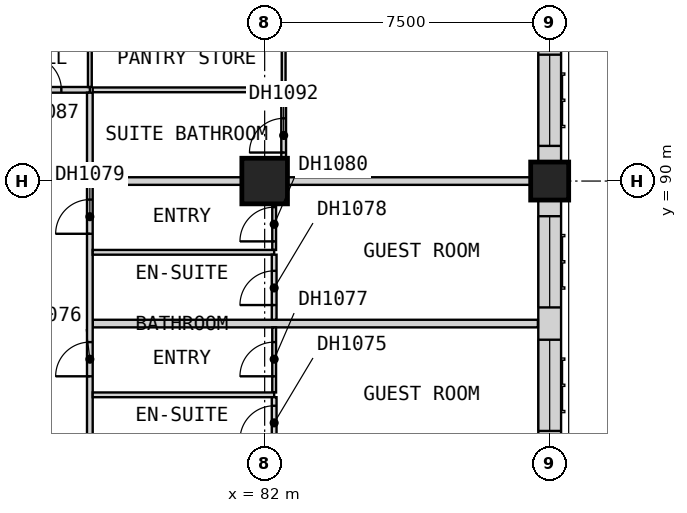
"""IFC4 building model, lengths in metres.
Left out: names, types, materials, properties, quantities, classifications, styles, units other than length and angle.
Written with IfcOpenShell. Run it as: python <this file> out.ifc"""

import sys

from ifc_helpers import new_model, si_unit, direction, frame, frame_2d, origin, origin_2d, place, context, subcontext, project, spatial, rectangle, extrude, element, fill, save


model = new_model("IFC4")
c1 = context("Model", 3, precision=1e-05, world=origin(), true_north=direction((0.0, 1.0)))
c2 = subcontext(c1, "Body", "Model", "MODEL_VIEW")
j1 = project(units=[si_unit("LENGTHUNIT", "METRE"), si_unit("PLANEANGLEUNIT", "RADIAN")], contexts=[c1])
p1 = place(None, origin())
s1 = spatial("IfcSite", under=j1, at=p1, CompositionType="ELEMENT")
p2 = place(p1, origin())
s2 = spatial("IfcBuilding", under=s1, at=p2, CompositionType="ELEMENT")
p3 = place(p2, frame((0.0, 0.0, 34.0)))
s3 = spatial("IfcBuildingStorey", under=s2, at=p3, CompositionType="ELEMENT", Elevation=34.0)
p4 = place(p3, frame((82.0, 90.0, 0.0), z_axis=(0.0, 0.0, 1.0), x_axis=(1.0, 0.0, 0.0)))
e1 = element("IfcColumn", 1, at=p4, inside=s3, PredefinedType="COLUMN", context=c2, shape_type="SweptSolid", body=[
    extrude(rectangle(XDim=1.2, YDim=1.2, at=origin_2d()), origin(), (0.0, 0.0, 1.0), 3.6),
])
p5 = place(p3, frame((89.5, 90.0, 0.0), z_axis=(0.0, 0.0, 1.0), x_axis=(1.0, 0.0, 0.0)))
e2 = element("IfcColumn", 2, at=p5, inside=s3, PredefinedType="COLUMN", context=c2, shape_type="SweptSolid", body=[
    extrude(rectangle(XDim=1.0, YDim=1.0, at=origin_2d()), origin(), (0.0, 0.0, 1.0), 3.6),
])
p6 = place(p3, frame((89.5, 83.0, 0.0), z_axis=(0.0, 0.0, 1.0), x_axis=(0.0, 1.0, 0.0)))
e3 = element("IfcWall", 3, at=p6, inside=s3, PredefinedType="SOLIDWALL", context=c2, shape_type="SweptSolid", body=[
    extrude(rectangle(XDim=6.5, YDim=0.6, at=frame_2d((3.25, 0.0))), origin(), (0.0, 0.0, 1.0), 2.85),
])
p7 = place(p6, frame((0.425, 0.0, 0.8)))
e4 = element("IfcOpeningElement", 4, at=p7, cuts=e3, PredefinedType="OPENING", context=c2, shape_type="SweptSolid", body=[
    extrude(rectangle(XDim=2.4, YDim=1.8, at=frame_2d((1.2, 0.9))), frame((0.0, 0.31, 0.0), z_axis=(0.0, -1.0, 0.0), x_axis=(1.0, 0.0, 0.0)), (0.0, 0.0, 1.0), 0.62),
])
p8 = place(p6, frame((3.675, 0.0, 0.8)))
e5 = element("IfcOpeningElement", 5, at=p8, cuts=e3, PredefinedType="OPENING", context=c2, shape_type="SweptSolid", body=[
    extrude(rectangle(XDim=2.4, YDim=1.8, at=frame_2d((1.2, 0.9))), frame((0.0, 0.31, 0.0), z_axis=(0.0, -1.0, 0.0), x_axis=(1.0, 0.0, 0.0)), (0.0, 0.0, 1.0), 0.62),
])
p9 = place(p3, frame((89.5, 90.5, 0.0), z_axis=(0.0, 0.0, 1.0), x_axis=(0.0, 1.0, 0.0)))
e6 = element("IfcWall", 6, at=p9, inside=s3, PredefinedType="SOLIDWALL", context=c2, shape_type="SweptSolid", body=[
    extrude(rectangle(XDim=6.0, YDim=0.6, at=frame_2d((3.0, 0.0))), origin(), (0.0, 0.0, 1.0), 2.85),
])
p10 = place(p9, frame((0.425, 0.0, 0.8)))
e7 = element("IfcOpeningElement", 7, at=p10, cuts=e6, PredefinedType="OPENING", context=c2, shape_type="SweptSolid", body=[
    extrude(rectangle(XDim=2.4, YDim=1.8, at=frame_2d((1.2, 0.9))), frame((0.0, 0.31, 0.0), z_axis=(0.0, -1.0, 0.0), x_axis=(1.0, 0.0, 0.0)), (0.0, 0.0, 1.0), 0.62),
])
p11 = place(p9, frame((3.425, 0.0, 0.8)))
e8 = element("IfcOpeningElement", 8, at=p11, cuts=e6, PredefinedType="OPENING", context=c2, shape_type="SweptSolid", body=[
    extrude(rectangle(XDim=2.4, YDim=1.8, at=frame_2d((1.2, 0.9))), frame((0.0, 0.31, 0.0), z_axis=(0.0, -1.0, 0.0), x_axis=(1.0, 0.0, 0.0)), (0.0, 0.0, 1.0), 0.62),
])
p12 = place(p3, frame((77.475, 86.25, 0.0), z_axis=(0.0, 0.0, 1.0), x_axis=(1.0, 0.0, 0.0)))
e9 = element("IfcWall", 9, at=p12, inside=s3, PredefinedType="PARTITIONING", context=c2, shape_type="SweptSolid", body=[
    extrude(rectangle(XDim=11.715, YDim=0.2, at=frame_2d((5.857, 0.0))), origin(), (0.0, 0.0, 1.0), 3.35),
])
p13 = place(p3, frame((77.475, 90.0, 0.0), z_axis=(0.0, 0.0, 1.0), x_axis=(1.0, 0.0, 0.0)))
e10 = element("IfcWall", 10, at=p13, inside=s3, PredefinedType="PARTITIONING", context=c2, shape_type="SweptSolid", body=[
    extrude(rectangle(XDim=12.525, YDim=0.2, at=frame_2d((6.262, 0.0))), origin(), (0.0, 0.0, 1.0), 3.35),
])
p14 = place(p3, frame((33.75, 92.4, 0.0), z_axis=(0.0, 0.0, 1.0), x_axis=(1.0, 0.0, 0.0)))
e11 = element("IfcWall", 11, at=p14, inside=s3, PredefinedType="PARTITIONING", context=c2, shape_type="SweptSolid", body=[
    extrude(rectangle(XDim=43.65, YDim=0.15, at=frame_2d((21.825, 0.0))), origin(), (0.0, 0.0, 1.0), 3.35),
])
p15 = place(p14, frame((5.175, 0.0, 0.0)))
e12 = element("IfcOpeningElement", 12, at=p15, cuts=e11, PredefinedType="OPENING", context=c2, shape_type="SweptSolid", body=[
    extrude(rectangle(XDim=0.9, YDim=2.1, at=frame_2d((0.45, 1.05))), frame((0.0, 0.085, 0.0), z_axis=(0.0, -1.0, 0.0), x_axis=(1.0, 0.0, 0.0)), (0.0, 0.0, 1.0), 0.17),
])
p16 = place(p14, frame((9.863, 0.0, 0.0)))
e13 = element("IfcOpeningElement", 13, at=p16, cuts=e11, PredefinedType="OPENING", context=c2, shape_type="SweptSolid", body=[
    extrude(rectangle(XDim=0.9, YDim=2.1, at=frame_2d((0.45, 1.05))), frame((0.0, 0.085, 0.0), z_axis=(0.0, -1.0, 0.0), x_axis=(1.0, 0.0, 0.0)), (0.0, 0.0, 1.0), 0.17),
])
p17 = place(p14, frame((13.613, 0.0, 0.0)))
e14 = element("IfcOpeningElement", 14, at=p17, cuts=e11, PredefinedType="OPENING", context=c2, shape_type="SweptSolid", body=[
    extrude(rectangle(XDim=0.9, YDim=2.1, at=frame_2d((0.45, 1.05))), frame((0.0, 0.085, 0.0), z_axis=(0.0, -1.0, 0.0), x_axis=(1.0, 0.0, 0.0)), (0.0, 0.0, 1.0), 0.17),
])
p18 = place(p14, frame((17.363, 0.0, 0.0)))
e15 = element("IfcOpeningElement", 15, at=p18, cuts=e11, PredefinedType="OPENING", context=c2, shape_type="SweptSolid", body=[
    extrude(rectangle(XDim=0.9, YDim=2.1, at=frame_2d((0.45, 1.05))), frame((0.0, 0.085, 0.0), z_axis=(0.0, -1.0, 0.0), x_axis=(1.0, 0.0, 0.0)), (0.0, 0.0, 1.0), 0.17),
])
p19 = place(p14, frame((21.113, 0.0, 0.0)))
e16 = element("IfcOpeningElement", 16, at=p19, cuts=e11, PredefinedType="OPENING", context=c2, shape_type="SweptSolid", body=[
    extrude(rectangle(XDim=0.9, YDim=2.1, at=frame_2d((0.45, 1.05))), frame((0.0, 0.085, 0.0), z_axis=(0.0, -1.0, 0.0), x_axis=(1.0, 0.0, 0.0)), (0.0, 0.0, 1.0), 0.17),
])
p20 = place(p14, frame((28.05, 0.0, 0.0)))
e17 = element("IfcOpeningElement", 17, at=p20, cuts=e11, PredefinedType="OPENING", context=c2, shape_type="SweptSolid", body=[
    extrude(rectangle(XDim=0.9, YDim=2.1, at=frame_2d((0.45, 1.05))), frame((0.0, 0.085, 0.0), z_axis=(0.0, -1.0, 0.0), x_axis=(1.0, 0.0, 0.0)), (0.0, 0.0, 1.0), 0.17),
])
p21 = place(p14, frame((32.363, 0.0, 0.0)))
e18 = element("IfcOpeningElement", 18, at=p21, cuts=e11, PredefinedType="OPENING", context=c2, shape_type="SweptSolid", body=[
    extrude(rectangle(XDim=0.9, YDim=2.1, at=frame_2d((0.45, 1.05))), frame((0.0, 0.085, 0.0), z_axis=(0.0, -1.0, 0.0), x_axis=(1.0, 0.0, 0.0)), (0.0, 0.0, 1.0), 0.17),
])
p22 = place(p14, frame((39.3, 0.0, 0.0)))
e19 = element("IfcOpeningElement", 19, at=p22, cuts=e11, PredefinedType="OPENING", context=c2, shape_type="SweptSolid", body=[
    extrude(rectangle(XDim=0.9, YDim=2.1, at=frame_2d((0.45, 1.05))), frame((0.0, 0.085, 0.0), z_axis=(0.0, -1.0, 0.0), x_axis=(1.0, 0.0, 0.0)), (0.0, 0.0, 1.0), 0.17),
])
p23 = place(p14, frame((42.0, 0.0, 0.0)))
e20 = element("IfcOpeningElement", 20, at=p23, cuts=e11, PredefinedType="OPENING", context=c2, shape_type="SweptSolid", body=[
    extrude(rectangle(XDim=0.9, YDim=2.1, at=frame_2d((0.45, 1.05))), frame((0.0, 0.085, 0.0), z_axis=(0.0, -1.0, 0.0), x_axis=(1.0, 0.0, 0.0)), (0.0, 0.0, 1.0), 0.17),
])
p24 = place(p3, frame((77.4, 50.175, 0.0), z_axis=(0.0, 0.0, 1.0), x_axis=(0.0, 1.0, 0.0)))
e21 = element("IfcWall", 21, at=p24, inside=s3, PredefinedType="PARTITIONING", context=c2, shape_type="SweptSolid", body=[
    extrude(rectangle(XDim=42.15, YDim=0.15, at=frame_2d((21.075, 0.0))), origin(), (0.0, 0.0, 1.0), 3.35),
])
p25 = place(p24, frame((4.688, 0.0, 0.0)))
e22 = element("IfcOpeningElement", 22, at=p25, cuts=e21, PredefinedType="OPENING", context=c2, shape_type="SweptSolid", body=[
    extrude(rectangle(XDim=0.9, YDim=2.1, at=frame_2d((0.45, 1.05))), frame((0.0, 0.085, 0.0), z_axis=(0.0, -1.0, 0.0), x_axis=(1.0, 0.0, 0.0)), (0.0, 0.0, 1.0), 0.17),
])
p26 = place(p24, frame((8.438, 0.0, 0.0)))
e23 = element("IfcOpeningElement", 23, at=p26, cuts=e21, PredefinedType="OPENING", context=c2, shape_type="SweptSolid", body=[
    extrude(rectangle(XDim=0.9, YDim=2.1, at=frame_2d((0.45, 1.05))), frame((0.0, 0.085, 0.0), z_axis=(0.0, -1.0, 0.0), x_axis=(1.0, 0.0, 0.0)), (0.0, 0.0, 1.0), 0.17),
])
p27 = place(p24, frame((12.188, 0.0, 0.0)))
e24 = element("IfcOpeningElement", 24, at=p27, cuts=e21, PredefinedType="OPENING", context=c2, shape_type="SweptSolid", body=[
    extrude(rectangle(XDim=0.9, YDim=2.1, at=frame_2d((0.45, 1.05))), frame((0.0, 0.085, 0.0), z_axis=(0.0, -1.0, 0.0), x_axis=(1.0, 0.0, 0.0)), (0.0, 0.0, 1.0), 0.17),
])
p28 = place(p24, frame((15.938, 0.0, 0.0)))
e25 = element("IfcOpeningElement", 25, at=p28, cuts=e21, PredefinedType="OPENING", context=c2, shape_type="SweptSolid", body=[
    extrude(rectangle(XDim=0.9, YDim=2.1, at=frame_2d((0.45, 1.05))), frame((0.0, 0.085, 0.0), z_axis=(0.0, -1.0, 0.0), x_axis=(1.0, 0.0, 0.0)), (0.0, 0.0, 1.0), 0.17),
])
p29 = place(p24, frame((19.688, 0.0, 0.0)))
e26 = element("IfcOpeningElement", 26, at=p29, cuts=e21, PredefinedType="OPENING", context=c2, shape_type="SweptSolid", body=[
    extrude(rectangle(XDim=0.9, YDim=2.1, at=frame_2d((0.45, 1.05))), frame((0.0, 0.085, 0.0), z_axis=(0.0, -1.0, 0.0), x_axis=(1.0, 0.0, 0.0)), (0.0, 0.0, 1.0), 0.17),
])
p30 = place(p24, frame((23.438, 0.0, 0.0)))
e27 = element("IfcOpeningElement", 27, at=p30, cuts=e21, PredefinedType="OPENING", context=c2, shape_type="SweptSolid", body=[
    extrude(rectangle(XDim=0.9, YDim=2.1, at=frame_2d((0.45, 1.05))), frame((0.0, 0.085, 0.0), z_axis=(0.0, -1.0, 0.0), x_axis=(1.0, 0.0, 0.0)), (0.0, 0.0, 1.0), 0.17),
])
p31 = place(p24, frame((27.188, 0.0, 0.0)))
e28 = element("IfcOpeningElement", 28, at=p31, cuts=e21, PredefinedType="OPENING", context=c2, shape_type="SweptSolid", body=[
    extrude(rectangle(XDim=0.9, YDim=2.1, at=frame_2d((0.45, 1.05))), frame((0.0, 0.085, 0.0), z_axis=(0.0, -1.0, 0.0), x_axis=(1.0, 0.0, 0.0)), (0.0, 0.0, 1.0), 0.17),
])
p32 = place(p24, frame((30.938, 0.0, 0.0)))
e29 = element("IfcOpeningElement", 29, at=p32, cuts=e21, PredefinedType="OPENING", context=c2, shape_type="SweptSolid", body=[
    extrude(rectangle(XDim=0.9, YDim=2.1, at=frame_2d((0.45, 1.05))), frame((0.0, 0.085, 0.0), z_axis=(0.0, -1.0, 0.0), x_axis=(1.0, 0.0, 0.0)), (0.0, 0.0, 1.0), 0.17),
])
p33 = place(p24, frame((34.688, 0.0, 0.0)))
e30 = element("IfcOpeningElement", 30, at=p33, cuts=e21, PredefinedType="OPENING", context=c2, shape_type="SweptSolid", body=[
    extrude(rectangle(XDim=0.9, YDim=2.1, at=frame_2d((0.45, 1.05))), frame((0.0, 0.085, 0.0), z_axis=(0.0, -1.0, 0.0), x_axis=(1.0, 0.0, 0.0)), (0.0, 0.0, 1.0), 0.17),
])
p34 = place(p24, frame((38.438, 0.0, 0.0)))
e31 = element("IfcOpeningElement", 31, at=p34, cuts=e21, PredefinedType="OPENING", context=c2, shape_type="SweptSolid", body=[
    extrude(rectangle(XDim=0.9, YDim=2.1, at=frame_2d((0.45, 1.05))), frame((0.0, 0.085, 0.0), z_axis=(0.0, -1.0, 0.0), x_axis=(1.0, 0.0, 0.0)), (0.0, 0.0, 1.0), 0.17),
])
p35 = place(p3, frame((77.4, 92.475, 0.0), z_axis=(0.0, 0.0, 1.0), x_axis=(0.0, 1.0, 0.0)))
e32 = element("IfcWall", 32, at=p35, inside=s3, PredefinedType="PARTITIONING", context=c2, shape_type="SweptSolid", body=[
    extrude(rectangle(XDim=3.475, YDim=0.1, at=frame_2d((1.737, 0.0))), origin(), (0.0, 0.0, 1.0), 3.35),
])
p36 = place(p35, frame((1.275, 0.0, 0.0)))
e33 = element("IfcOpeningElement", 33, at=p36, cuts=e32, PredefinedType="OPENING", context=c2, shape_type="SweptSolid", body=[
    extrude(rectangle(XDim=0.9, YDim=2.1, at=frame_2d((0.45, 1.05))), frame((0.0, 0.06, 0.0), z_axis=(0.0, -1.0, 0.0), x_axis=(1.0, 0.0, 0.0)), (0.0, 0.0, 1.0), 0.12),
])
p37 = place(p3, frame((82.25, 84.438, 0.0), z_axis=(0.0, 0.0, 1.0), x_axis=(0.0, 1.0, 0.0)))
e34 = element("IfcWall", 34, at=p37, inside=s3, PredefinedType="PARTITIONING", context=c2, shape_type="SweptSolid", body=[
    extrude(rectangle(XDim=1.712, YDim=0.1, at=frame_2d((0.856, 0.0))), origin(), (0.0, 0.0, 1.0), 3.35),
])
p38 = place(p37, frame((0.425, 0.0, 0.0)))
e35 = element("IfcOpeningElement", 35, at=p38, cuts=e34, PredefinedType="OPENING", context=c2, shape_type="SweptSolid", body=[
    extrude(rectangle(XDim=0.9, YDim=2.1, at=frame_2d((0.45, 1.05))), frame((0.0, 0.06, 0.0), z_axis=(0.0, -1.0, 0.0), x_axis=(1.0, 0.0, 0.0)), (0.0, 0.0, 1.0), 0.12),
])
p39 = place(p3, frame((82.25, 88.188, 0.0), z_axis=(0.0, 0.0, 1.0), x_axis=(0.0, 1.0, 0.0)))
e36 = element("IfcWall", 36, at=p39, inside=s3, PredefinedType="PARTITIONING", context=c2, shape_type="SweptSolid", body=[
    extrude(rectangle(XDim=1.712, YDim=0.1, at=frame_2d((0.856, 0.0))), origin(), (0.0, 0.0, 1.0), 3.35),
])
p40 = place(p39, frame((0.225, 0.0, 0.0)))
e37 = element("IfcOpeningElement", 37, at=p40, cuts=e36, PredefinedType="OPENING", context=c2, shape_type="SweptSolid", body=[
    extrude(rectangle(XDim=0.9, YDim=2.1, at=frame_2d((0.45, 1.05))), frame((0.0, 0.06, 0.0), z_axis=(0.0, -1.0, 0.0), x_axis=(1.0, 0.0, 0.0)), (0.0, 0.0, 1.0), 0.12),
])
p41 = place(p3, frame((82.5, 92.462, 0.0), z_axis=(0.0, 0.0, 1.0), x_axis=(0.0, 1.0, 0.0)))
e38 = element("IfcWall", 38, at=p41, inside=s3, PredefinedType="PARTITIONING", context=c2, shape_type="SweptSolid", body=[
    extrude(rectangle(XDim=11.728, YDim=0.1, at=frame_2d((5.864, 0.0))), origin(), (0.0, 0.0, 1.0), 3.35),
])
p42 = place(p41, frame((9.837, 0.0, 0.0)))
e39 = element("IfcOpeningElement", 39, at=p42, cuts=e38, PredefinedType="OPENING", context=c2, shape_type="SweptSolid", body=[
    extrude(rectangle(XDim=0.9, YDim=2.1, at=frame_2d((0.45, 1.05))), frame((0.0, 0.06, 0.0), z_axis=(0.0, -1.0, 0.0), x_axis=(1.0, 0.0, 0.0)), (0.0, 0.0, 1.0), 0.12),
])
p43 = place(p41, frame((1.288, 0.0, 0.0)))
e40 = element("IfcOpeningElement", 40, at=p43, cuts=e38, PredefinedType="OPENING", context=c2, shape_type="SweptSolid", body=[
    extrude(rectangle(XDim=0.9, YDim=2.1, at=frame_2d((0.45, 1.05))), frame((0.0, 0.06, 0.0), z_axis=(0.0, -1.0, 0.0), x_axis=(1.0, 0.0, 0.0)), (0.0, 0.0, 1.0), 0.12),
])
for number, where, z_axis, x_axis in (
    (41, (77.475, 84.375, 0.0), (0.0, 0.0, 1.0), (1.0, 0.0, 0.0)),
    (42, (77.475, 88.125, 0.0), (0.0, 0.0, 1.0), (1.0, 0.0, 0.0)),
):
    element("IfcWall", number, at=place(p3, frame(where, z_axis=z_axis, x_axis=x_axis)), inside=s3, PredefinedType="PARTITIONING", context=c2, shape_type="SweptSolid", body=[
        extrude(rectangle(XDim=4.775, YDim=0.125, at=frame_2d((2.387, 0.0))), origin(), (0.0, 0.0, 1.0), 3.35),
    ])
p44 = place(p3, frame((77.475, 92.4, 0.0), z_axis=(0.0, 0.0, 1.0), x_axis=(1.0, 0.0, 0.0)))
e43 = element("IfcWall", 43, at=p44, inside=s3, PredefinedType="PARTITIONING", context=c2, shape_type="SweptSolid", body=[
    extrude(rectangle(XDim=5.025, YDim=0.125, at=frame_2d((2.512, 0.0))), origin(), (0.0, 0.0, 1.0), 3.35),
])
p45 = place(p3, frame((82.25, 82.6, 0.0), z_axis=(0.0, 0.0, 1.0), x_axis=(0.0, 1.0, 0.0)))
e44 = element("IfcWall", 44, at=p45, inside=s3, PredefinedType="PARTITIONING", context=c2, shape_type="SweptSolid", body=[
    extrude(rectangle(XDim=1.712, YDim=0.125, at=frame_2d((0.856, 0.0))), origin(), (0.0, 0.0, 1.0), 3.35),
])
p46 = place(p45, frame((0.587, 0.0, 0.0)))
e45 = element("IfcOpeningElement", 45, at=p46, cuts=e44, PredefinedType="OPENING", context=c2, shape_type="SweptSolid", body=[
    extrude(rectangle(XDim=0.9, YDim=2.1, at=frame_2d((0.45, 1.05))), frame((0.0, 0.073, 0.0), z_axis=(0.0, -1.0, 0.0), x_axis=(1.0, 0.0, 0.0)), (0.0, 0.0, 1.0), 0.145),
])
p47 = place(p3, frame((82.25, 86.35, 0.0), z_axis=(0.0, 0.0, 1.0), x_axis=(0.0, 1.0, 0.0)))
e46 = element("IfcWall", 46, at=p47, inside=s3, PredefinedType="PARTITIONING", context=c2, shape_type="SweptSolid", body=[
    extrude(rectangle(XDim=1.712, YDim=0.125, at=frame_2d((0.856, 0.0))), origin(), (0.0, 0.0, 1.0), 3.35),
])
p48 = place(p47, frame((0.387, 0.0, 0.0)))
e47 = element("IfcOpeningElement", 47, at=p48, cuts=e46, PredefinedType="OPENING", context=c2, shape_type="SweptSolid", body=[
    extrude(rectangle(XDim=0.9, YDim=2.1, at=frame_2d((0.45, 1.05))), frame((0.0, 0.073, 0.0), z_axis=(0.0, -1.0, 0.0), x_axis=(1.0, 0.0, 0.0)), (0.0, 0.0, 1.0), 0.145),
])
p49 = place(p3, frame((82.5, 90.1, 0.0), z_axis=(0.0, 0.0, 1.0), x_axis=(0.0, 1.0, 0.0)))
e48 = element("IfcWall", 48, at=p49, inside=s3, PredefinedType="PARTITIONING", context=c2, shape_type="SweptSolid", body=[
    extrude(rectangle(XDim=2.237, YDim=0.125, at=frame_2d((1.119, 0.0))), origin(), (0.0, 0.0, 1.0), 3.35),
])
p50 = place(p49, frame((0.65, 0.0, 0.0)))
e49 = element("IfcOpeningElement", 49, at=p50, cuts=e48, PredefinedType="OPENING", context=c2, shape_type="SweptSolid", body=[
    extrude(rectangle(XDim=0.9, YDim=2.1, at=frame_2d((0.45, 1.05))), frame((0.0, 0.073, 0.0), z_axis=(0.0, -1.0, 0.0), x_axis=(1.0, 0.0, 0.0)), (0.0, 0.0, 1.0), 0.145),
])
p51 = place(p7, origin())
e50 = element("IfcWindow", 50, at=p51, inside=s3, PartitioningType="SINGLE_PANEL", PredefinedType="WINDOW", context=c2, shape_type="SweptSolid", body=[
    extrude(rectangle(XDim=2.4, YDim=1.8, at=frame_2d((1.2, 0.9))), frame((0.0, -0.07, 0.0), z_axis=(0.0, -1.0, 0.0), x_axis=(1.0, 0.0, 0.0)), (0.0, 0.0, 1.0), 0.06),
])
fill(e4, e50)
p52 = place(p8, origin())
e51 = element("IfcWindow", 51, at=p52, inside=s3, PartitioningType="SINGLE_PANEL", PredefinedType="WINDOW", context=c2, shape_type="SweptSolid", body=[
    extrude(rectangle(XDim=2.4, YDim=1.8, at=frame_2d((1.2, 0.9))), frame((0.0, -0.07, 0.0), z_axis=(0.0, -1.0, 0.0), x_axis=(1.0, 0.0, 0.0)), (0.0, 0.0, 1.0), 0.06),
])
fill(e5, e51)
p53 = place(p10, origin())
e52 = element("IfcWindow", 52, at=p53, inside=s3, PartitioningType="SINGLE_PANEL", PredefinedType="WINDOW", context=c2, shape_type="SweptSolid", body=[
    extrude(rectangle(XDim=2.4, YDim=1.8, at=frame_2d((1.2, 0.9))), frame((0.0, -0.07, 0.0), z_axis=(0.0, -1.0, 0.0), x_axis=(1.0, 0.0, 0.0)), (0.0, 0.0, 1.0), 0.06),
])
fill(e7, e52)
p54 = place(p46, origin())
e53 = element("IfcDoor", 53, at=p54, inside=s3, OperationType="SINGLE_SWING_RIGHT", PredefinedType="DOOR", context=c2, shape_type="SweptSolid", body=[
    extrude(rectangle(XDim=0.9, YDim=2.1, at=frame_2d((0.45, 1.05))), frame((0.0, 0.025, 0.0), z_axis=(0.0, -1.0, 0.0), x_axis=(1.0, 0.0, 0.0)), (0.0, 0.0, 1.0), 0.05),
])
fill(e45, e53)
p55 = place(p33, origin())
e54 = element("IfcDoor", 54, at=p55, inside=s3, OperationType="SINGLE_SWING_RIGHT", PredefinedType="DOOR", context=c2, shape_type="SweptSolid", body=[
    extrude(rectangle(XDim=0.9, YDim=2.1, at=frame_2d((0.45, 1.05))), frame((0.0, 0.025, 0.0), z_axis=(0.0, -1.0, 0.0), x_axis=(1.0, 0.0, 0.0)), (0.0, 0.0, 1.0), 0.05),
])
fill(e30, e54)
p56 = place(p38, origin())
e55 = element("IfcDoor", 55, at=p56, inside=s3, OperationType="SINGLE_SWING_LEFT", PredefinedType="DOOR", context=c2, shape_type="SweptSolid", body=[
    extrude(rectangle(XDim=0.9, YDim=2.1, at=frame_2d((0.45, 1.05))), frame((0.0, 0.025, 0.0), z_axis=(0.0, -1.0, 0.0), x_axis=(1.0, 0.0, 0.0)), (0.0, 0.0, 1.0), 0.05),
])
fill(e35, e55)
p57 = place(p48, origin())
e56 = element("IfcDoor", 56, at=p57, inside=s3, OperationType="SINGLE_SWING_LEFT", PredefinedType="DOOR", context=c2, shape_type="SweptSolid", body=[
    extrude(rectangle(XDim=0.9, YDim=2.1, at=frame_2d((0.45, 1.05))), frame((0.0, 0.025, 0.0), z_axis=(0.0, -1.0, 0.0), x_axis=(1.0, 0.0, 0.0)), (0.0, 0.0, 1.0), 0.05),
])
fill(e47, e56)
p58 = place(p34, origin())
e57 = element("IfcDoor", 57, at=p58, inside=s3, OperationType="SINGLE_SWING_RIGHT", PredefinedType="DOOR", context=c2, shape_type="SweptSolid", body=[
    extrude(rectangle(XDim=0.9, YDim=2.1, at=frame_2d((0.45, 1.05))), frame((0.0, 0.025, 0.0), z_axis=(0.0, -1.0, 0.0), x_axis=(1.0, 0.0, 0.0)), (0.0, 0.0, 1.0), 0.05),
])
fill(e31, e57)
p59 = place(p40, origin())
e58 = element("IfcDoor", 58, at=p59, inside=s3, OperationType="SINGLE_SWING_LEFT", PredefinedType="DOOR", context=c2, shape_type="SweptSolid", body=[
    extrude(rectangle(XDim=0.9, YDim=2.1, at=frame_2d((0.45, 1.05))), frame((0.0, 0.025, 0.0), z_axis=(0.0, -1.0, 0.0), x_axis=(1.0, 0.0, 0.0)), (0.0, 0.0, 1.0), 0.05),
])
fill(e37, e58)
p60 = place(p23, origin())
e59 = element("IfcDoor", 59, at=p60, inside=s3, OperationType="SINGLE_SWING_RIGHT", PredefinedType="DOOR", context=c2, shape_type="SweptSolid", body=[
    extrude(rectangle(XDim=0.9, YDim=2.1, at=frame_2d((0.45, 1.05))), frame((0.0, 0.025, 0.0), z_axis=(0.0, -1.0, 0.0), x_axis=(1.0, 0.0, 0.0)), (0.0, 0.0, 1.0), 0.05),
])
fill(e20, e59)
p61 = place(p50, origin())
e60 = element("IfcDoor", 60, at=p61, inside=s3, OperationType="SINGLE_SWING_LEFT", PredefinedType="DOOR", context=c2, shape_type="SweptSolid", body=[
    extrude(rectangle(XDim=0.9, YDim=2.1, at=frame_2d((0.45, 1.05))), frame((0.0, 0.025, 0.0), z_axis=(0.0, -1.0, 0.0), x_axis=(1.0, 0.0, 0.0)), (0.0, 0.0, 1.0), 0.05),
])
fill(e49, e60)
save(model, sys.argv[1])
